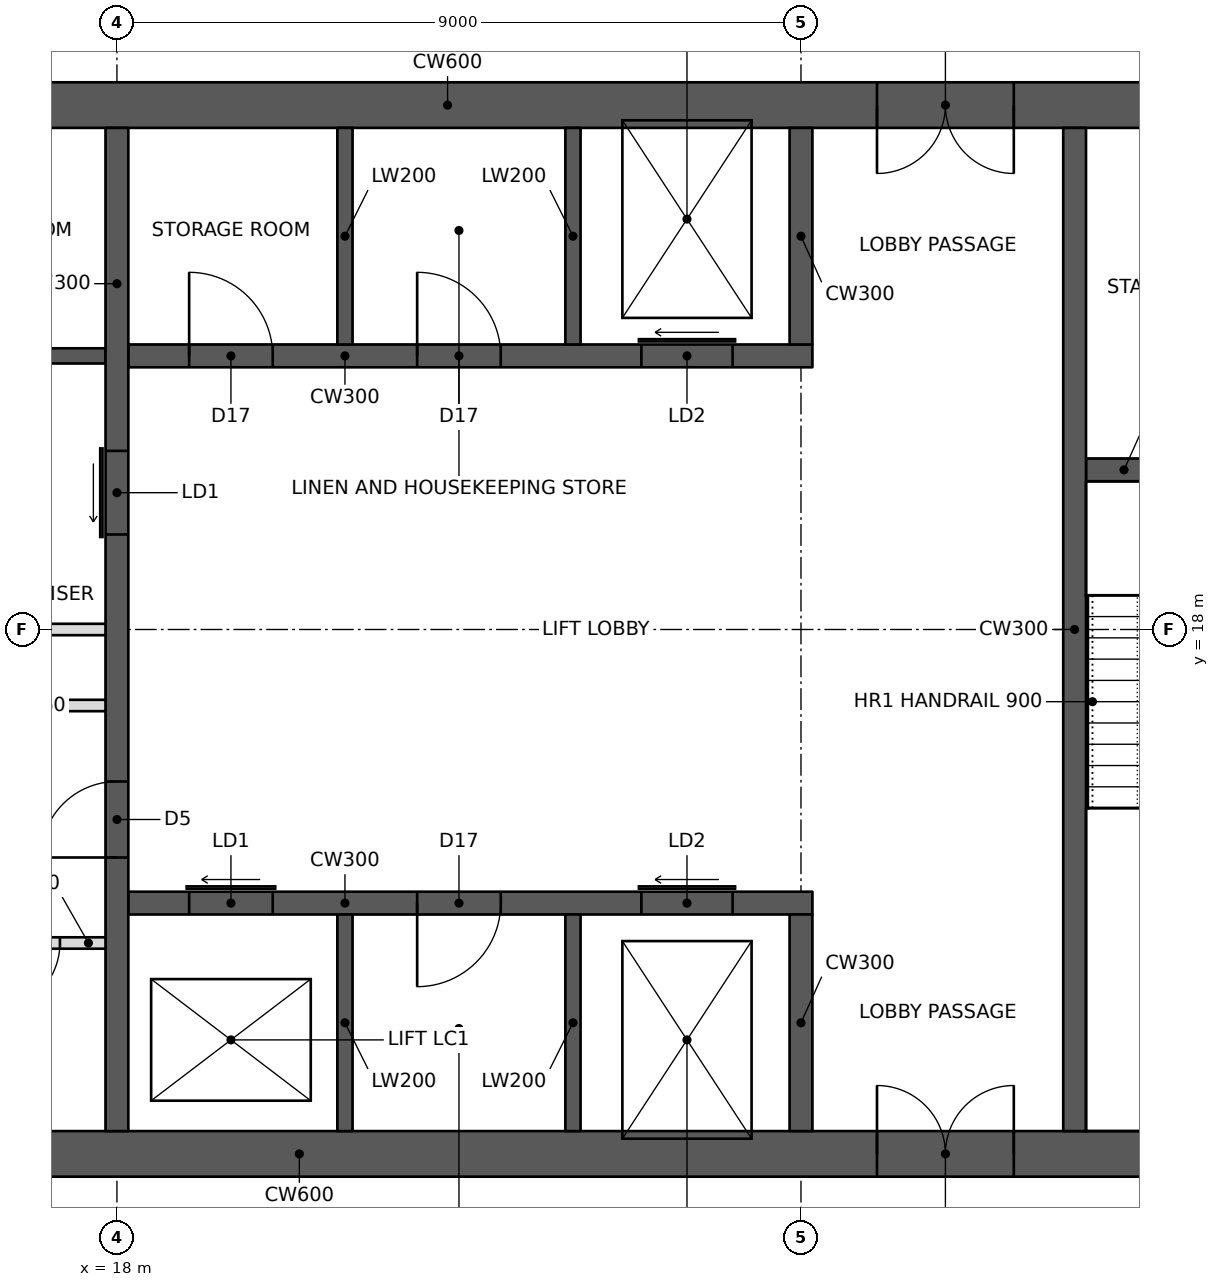
"""IFC4 building model, lengths in metres.
Left out: names, types, materials, properties, quantities, classifications, styles, units other than length and angle.
Written with IfcOpenShell. Run it as: python <this file> out.ifc"""

import sys

from ifc_helpers import new_model, si_unit, direction, frame, frame_2d, origin, place, context, subcontext, project, spatial, rectangle, extrude, element, fill, save


model = new_model("IFC4")
c1 = context("Model", 3, precision=1e-05, world=origin(), true_north=direction((0.0, 1.0)))
c2 = subcontext(c1, "Body", "Model", "MODEL_VIEW")
j1 = project(units=[si_unit("LENGTHUNIT", "METRE"), si_unit("PLANEANGLEUNIT", "RADIAN")], contexts=[c1])
p1 = place(None, origin())
s1 = spatial("IfcSite", under=j1, at=p1, CompositionType="ELEMENT")
p2 = place(p1, origin())
s2 = spatial("IfcBuilding", under=s1, at=p2, CompositionType="ELEMENT")
p3 = place(p2, frame((0.0, 0.0, 248.2)))
s3 = spatial("IfcBuildingStorey", under=s2, at=p3, CompositionType="ELEMENT", Elevation=248.2)
p4 = place(p3, frame((10.8, 11.1, 0.0), z_axis=(0.0, 0.0, 1.0), x_axis=(1.0, 0.0, 0.0)))
e1 = element("IfcWall", 1, at=p4, inside=s3, PredefinedType="SHEAR", context=c2, shape_type="SweptSolid", body=[
    extrude(rectangle(XDim=23.4, YDim=0.6, at=frame_2d((11.7, 0.0))), origin(), (0.0, 0.0, 1.0), 3.6),
])
p5 = place(p4, frame((1.0, 0.0, 0.0)))
e2 = element("IfcOpeningElement", 2, at=p5, cuts=e1, PredefinedType="OPENING", context=c2, shape_type="SweptSolid", body=[
    extrude(rectangle(XDim=1.0, YDim=2.1, at=frame_2d((0.5, 1.05))), frame((0.0, 0.31, 0.0), z_axis=(0.0, -1.0, 0.0), x_axis=(1.0, 0.0, 0.0)), (0.0, 0.0, 1.0), 0.62),
])
p6 = place(p4, frame((17.2, 0.0, 0.0)))
e3 = element("IfcOpeningElement", 3, at=p6, cuts=e1, PredefinedType="OPENING", context=c2, shape_type="SweptSolid", body=[
    extrude(rectangle(XDim=1.8, YDim=2.1, at=frame_2d((0.9, 1.05))), frame((0.0, 0.31, 0.0), z_axis=(0.0, -1.0, 0.0), x_axis=(1.0, 0.0, 0.0)), (0.0, 0.0, 1.0), 0.62),
])
p7 = place(p3, frame((10.8, 24.9, 0.0), z_axis=(0.0, 0.0, 1.0), x_axis=(1.0, 0.0, 0.0)))
e4 = element("IfcWall", 4, at=p7, inside=s3, PredefinedType="SHEAR", context=c2, shape_type="SweptSolid", body=[
    extrude(rectangle(XDim=23.4, YDim=0.6, at=frame_2d((11.7, 0.0))), origin(), (0.0, 0.0, 1.0), 3.6),
])
p8 = place(p7, frame((17.2, 0.0, 0.0)))
e5 = element("IfcOpeningElement", 5, at=p8, cuts=e4, PredefinedType="OPENING", context=c2, shape_type="SweptSolid", body=[
    extrude(rectangle(XDim=1.8, YDim=2.1, at=frame_2d((0.9, 1.05))), frame((0.0, 0.31, 0.0), z_axis=(0.0, -1.0, 0.0), x_axis=(1.0, 0.0, 0.0)), (0.0, 0.0, 1.0), 0.62),
])
p9 = place(p7, frame((21.1, 0.0, 0.0)))
e6 = element("IfcOpeningElement", 6, at=p9, cuts=e4, PredefinedType="OPENING", context=c2, shape_type="SweptSolid", body=[
    extrude(rectangle(XDim=1.0, YDim=2.1, at=frame_2d((0.5, 1.05))), frame((0.0, 0.31, 0.0), z_axis=(0.0, -1.0, 0.0), x_axis=(1.0, 0.0, 0.0)), (0.0, 0.0, 1.0), 0.62),
])
p10 = place(p7, frame((4.9, 0.0, 0.0)))
e7 = element("IfcOpeningElement", 7, at=p10, cuts=e4, PredefinedType="OPENING", context=c2, shape_type="SweptSolid", body=[
    extrude(rectangle(XDim=1.0, YDim=2.1, at=frame_2d((0.5, 1.05))), frame((0.0, 0.31, 0.0), z_axis=(0.0, -1.0, 0.0), x_axis=(1.0, 0.0, 0.0)), (0.0, 0.0, 1.0), 0.62),
])
p11 = place(p3, frame((18.0, 11.4, 0.0), z_axis=(0.0, 0.0, 1.0), x_axis=(0.0, 1.0, 0.0)))
e8 = element("IfcWall", 8, at=p11, inside=s3, PredefinedType="SHEAR", context=c2, shape_type="SweptSolid", body=[
    extrude(rectangle(XDim=13.2, YDim=0.3, at=frame_2d((6.6, 0.0))), origin(), (0.0, 0.0, 1.0), 3.6),
])
p12 = place(p11, frame((3.6, 0.0, 0.0)))
e9 = element("IfcOpeningElement", 9, at=p12, cuts=e8, PredefinedType="OPENING", context=c2, shape_type="SweptSolid", body=[
    extrude(rectangle(XDim=1.0, YDim=2.1, at=frame_2d((0.5, 1.05))), frame((0.0, 0.16, 0.0), z_axis=(0.0, -1.0, 0.0), x_axis=(1.0, 0.0, 0.0)), (0.0, 0.0, 1.0), 0.32),
])
p13 = place(p11, frame((7.85, 0.0, 0.0)))
e10 = element("IfcOpeningElement", 10, at=p13, cuts=e8, PredefinedType="OPENING", context=c2, shape_type="SweptSolid", body=[
    extrude(rectangle(XDim=1.1, YDim=2.1, at=frame_2d((0.55, 1.05))), frame((0.0, 0.16, 0.0), z_axis=(0.0, -1.0, 0.0), x_axis=(1.0, 0.0, 0.0)), (0.0, 0.0, 1.0), 0.32),
])
p14 = place(p3, frame((14.55, 18.0, 0.0), z_axis=(0.0, 0.0, 1.0), x_axis=(1.0, 0.0, 0.0)))
e11 = element("IfcWall", 11, at=p14, inside=s3, PredefinedType="PARTITIONING", context=c2, shape_type="SweptSolid", body=[
    extrude(rectangle(XDim=3.3, YDim=0.15, at=frame_2d((1.65, 0.0))), origin(), (0.0, 0.0, 1.0), 3.4),
])
p15 = place(p3, frame((18.15, 14.4, 0.0), z_axis=(0.0, 0.0, 1.0), x_axis=(1.0, 0.0, 0.0)))
e12 = element("IfcWall", 12, at=p15, inside=s3, PredefinedType="SHEAR", context=c2, shape_type="SweptSolid", body=[
    extrude(rectangle(XDim=9.0, YDim=0.3, at=frame_2d((4.5, 0.0))), origin(), (0.0, 0.0, 1.0), 3.6),
])
p16 = place(p15, frame((0.8, 0.0, 0.0)))
e13 = element("IfcOpeningElement", 13, at=p16, cuts=e12, PredefinedType="OPENING", context=c2, shape_type="SweptSolid", body=[
    extrude(rectangle(XDim=1.1, YDim=2.1, at=frame_2d((0.55, 1.05))), frame((0.0, 0.16, 0.0), z_axis=(0.0, -1.0, 0.0), x_axis=(1.0, 0.0, 0.0)), (0.0, 0.0, 1.0), 0.32),
])
p17 = place(p15, frame((6.75, 0.0, 0.0)))
e14 = element("IfcOpeningElement", 14, at=p17, cuts=e12, PredefinedType="OPENING", context=c2, shape_type="SweptSolid", body=[
    extrude(rectangle(XDim=1.2, YDim=2.1, at=frame_2d((0.6, 1.05))), frame((0.0, 0.16, 0.0), z_axis=(0.0, -1.0, 0.0), x_axis=(1.0, 0.0, 0.0)), (0.0, 0.0, 1.0), 0.32),
])
p18 = place(p15, frame((3.8, 0.0, 0.0)))
e15 = element("IfcOpeningElement", 15, at=p18, cuts=e12, PredefinedType="OPENING", context=c2, shape_type="SweptSolid", body=[
    extrude(rectangle(XDim=1.1, YDim=2.1, at=frame_2d((0.55, 1.05))), frame((0.0, 0.16, 0.0), z_axis=(0.0, -1.0, 0.0), x_axis=(1.0, 0.0, 0.0)), (0.0, 0.0, 1.0), 0.32),
])
p19 = place(p3, frame((27.0, 11.4, 0.0), z_axis=(0.0, 0.0, 1.0), x_axis=(0.0, 1.0, 0.0)))
e16 = element("IfcWall", 16, at=p19, inside=s3, PredefinedType="SHEAR", context=c2, shape_type="SweptSolid", body=[
    extrude(rectangle(XDim=2.85, YDim=0.3, at=frame_2d((1.425, 0.0))), origin(), (0.0, 0.0, 1.0), 3.6),
])
for number, where, z_axis, x_axis in (
    (17, (21.0, 11.4, 0.0), (0.0, 0.0, 1.0), (0.0, 1.0, 0.0)),
    (18, (24.0, 11.4, 0.0), (0.0, 0.0, 1.0), (0.0, 1.0, 0.0)),
):
    element("IfcWall", number, at=place(p3, frame(where, z_axis=z_axis, x_axis=x_axis)), inside=s3, PredefinedType="SHEAR", context=c2, shape_type="SweptSolid", body=[
        extrude(rectangle(XDim=2.85, YDim=0.2, at=frame_2d((1.425, 0.0))), origin(), (0.0, 0.0, 1.0), 3.6),
    ])
p20 = place(p3, frame((18.15, 21.6, 0.0), z_axis=(0.0, 0.0, 1.0), x_axis=(1.0, 0.0, 0.0)))
e19 = element("IfcWall", 19, at=p20, inside=s3, PredefinedType="SHEAR", context=c2, shape_type="SweptSolid", body=[
    extrude(rectangle(XDim=9.0, YDim=0.3, at=frame_2d((4.5, 0.0))), origin(), (0.0, 0.0, 1.0), 3.6),
])
p21 = place(p20, frame((6.75, 0.0, 0.0)))
e20 = element("IfcOpeningElement", 20, at=p21, cuts=e19, PredefinedType="OPENING", context=c2, shape_type="SweptSolid", body=[
    extrude(rectangle(XDim=1.2, YDim=2.1, at=frame_2d((0.6, 1.05))), frame((0.0, 0.16, 0.0), z_axis=(0.0, -1.0, 0.0), x_axis=(1.0, 0.0, 0.0)), (0.0, 0.0, 1.0), 0.32),
])
p22 = place(p20, frame((0.8, 0.0, 0.0)))
e21 = element("IfcOpeningElement", 21, at=p22, cuts=e19, PredefinedType="OPENING", context=c2, shape_type="SweptSolid", body=[
    extrude(rectangle(XDim=1.1, YDim=2.1, at=frame_2d((0.55, 1.05))), frame((0.0, 0.16, 0.0), z_axis=(0.0, -1.0, 0.0), x_axis=(1.0, 0.0, 0.0)), (0.0, 0.0, 1.0), 0.32),
])
p23 = place(p20, frame((3.8, 0.0, 0.0)))
e22 = element("IfcOpeningElement", 22, at=p23, cuts=e19, PredefinedType="OPENING", context=c2, shape_type="SweptSolid", body=[
    extrude(rectangle(XDim=1.1, YDim=2.1, at=frame_2d((0.55, 1.05))), frame((0.0, 0.16, 0.0), z_axis=(0.0, -1.0, 0.0), x_axis=(1.0, 0.0, 0.0)), (0.0, 0.0, 1.0), 0.32),
])
p24 = place(p3, frame((27.0, 21.75, 0.0), z_axis=(0.0, 0.0, 1.0), x_axis=(0.0, 1.0, 0.0)))
e23 = element("IfcWall", 23, at=p24, inside=s3, PredefinedType="SHEAR", context=c2, shape_type="SweptSolid", body=[
    extrude(rectangle(XDim=2.85, YDim=0.3, at=frame_2d((1.425, 0.0))), origin(), (0.0, 0.0, 1.0), 3.6),
])
for number, where, z_axis, x_axis in (
    (24, (21.0, 21.75, 0.0), (0.0, 0.0, 1.0), (0.0, 1.0, 0.0)),
    (25, (24.0, 21.75, 0.0), (0.0, 0.0, 1.0), (0.0, 1.0, 0.0)),
):
    element("IfcWall", number, at=place(p3, frame(where, z_axis=z_axis, x_axis=x_axis)), inside=s3, PredefinedType="SHEAR", context=c2, shape_type="SweptSolid", body=[
        extrude(rectangle(XDim=2.85, YDim=0.2, at=frame_2d((1.425, 0.0))), origin(), (0.0, 0.0, 1.0), 3.6),
    ])
p25 = place(p3, frame((30.6, 11.4, 0.0), z_axis=(0.0, 0.0, 1.0), x_axis=(0.0, 1.0, 0.0)))
e26 = element("IfcWall", 26, at=p25, inside=s3, PredefinedType="SHEAR", context=c2, shape_type="SweptSolid", body=[
    extrude(rectangle(XDim=13.2, YDim=0.3, at=frame_2d((6.6, 0.0))), origin(), (0.0, 0.0, 1.0), 3.6),
])
p26 = place(p3, frame((30.75, 20.1, 0.0), z_axis=(0.0, 0.0, 1.0), x_axis=(1.0, 0.0, 0.0)))
e27 = element("IfcWall", 27, at=p26, inside=s3, PredefinedType="SHEAR", context=c2, shape_type="SweptSolid", body=[
    extrude(rectangle(XDim=2.85, YDim=0.3, at=frame_2d((1.425, 0.0))), origin(), (0.0, 0.0, 1.0), 3.6),
])
p27 = place(p26, frame((1.15, 0.0, 0.0)))
e28 = element("IfcOpeningElement", 28, at=p27, cuts=e27, PredefinedType="OPENING", context=c2, shape_type="SweptSolid", body=[
    extrude(rectangle(XDim=1.0, YDim=2.1, at=frame_2d((0.5, 1.05))), frame((0.0, 0.16, 0.0), z_axis=(0.0, -1.0, 0.0), x_axis=(1.0, 0.0, 0.0)), (0.0, 0.0, 1.0), 0.32),
])
p28 = place(p3, frame((14.55, 21.6, 0.0), z_axis=(0.0, 0.0, 1.0), x_axis=(1.0, 0.0, 0.0)))
e29 = element("IfcWall", 29, at=p28, inside=s3, PredefinedType="SHEAR", context=c2, shape_type="SweptSolid", body=[
    extrude(rectangle(XDim=3.3, YDim=0.2, at=frame_2d((1.65, 0.0))), origin(), (0.0, 0.0, 1.0), 3.6),
])
p29 = place(p3, frame((14.55, 17.0, 0.0), z_axis=(0.0, 0.0, 1.0), x_axis=(1.0, 0.0, 0.0)))
e30 = element("IfcWall", 30, at=p29, inside=s3, PredefinedType="PARTITIONING", context=c2, shape_type="SweptSolid", body=[
    extrude(rectangle(XDim=3.3, YDim=0.15, at=frame_2d((1.65, 0.0))), origin(), (0.0, 0.0, 1.0), 3.4),
])
p30 = place(p29, frame((0.3, 0.0, 0.0)))
e31 = element("IfcOpeningElement", 31, at=p30, cuts=e30, PredefinedType="OPENING", context=c2, shape_type="SweptSolid", body=[
    extrude(rectangle(XDim=1.0, YDim=2.1, at=frame_2d((0.5, 1.05))), frame((0.0, 0.085, 0.0), z_axis=(0.0, -1.0, 0.0), x_axis=(1.0, 0.0, 0.0)), (0.0, 0.0, 1.0), 0.17),
])
p31 = place(p3, frame((14.55, 13.875, 0.0), z_axis=(0.0, 0.0, 1.0), x_axis=(1.0, 0.0, 0.0)))
e32 = element("IfcWall", 32, at=p31, inside=s3, PredefinedType="PARTITIONING", context=c2, shape_type="SweptSolid", body=[
    extrude(rectangle(XDim=3.3, YDim=0.15, at=frame_2d((1.65, 0.0))), origin(), (0.0, 0.0, 1.0), 3.4),
])
p32 = place(p31, frame((0.2, 0.0, 0.0)))
e33 = element("IfcOpeningElement", 33, at=p32, cuts=e32, PredefinedType="OPENING", context=c2, shape_type="SweptSolid", body=[
    extrude(rectangle(XDim=0.9, YDim=2.1, at=frame_2d((0.45, 1.05))), frame((0.0, 0.085, 0.0), z_axis=(0.0, -1.0, 0.0), x_axis=(1.0, 0.0, 0.0)), (0.0, 0.0, 1.0), 0.17),
])
p33 = place(p31, frame((1.8, 0.0, 0.0)))
e34 = element("IfcOpeningElement", 34, at=p33, cuts=e32, PredefinedType="OPENING", context=c2, shape_type="SweptSolid", body=[
    extrude(rectangle(XDim=0.9, YDim=2.1, at=frame_2d((0.45, 1.05))), frame((0.0, 0.085, 0.0), z_axis=(0.0, -1.0, 0.0), x_axis=(1.0, 0.0, 0.0)), (0.0, 0.0, 1.0), 0.17),
])
p34 = place(p33, frame((0.9, 0.0, 0.0), z_axis=(0.0, 0.0, 1.0), x_axis=(-1.0, 0.0, 0.0)))
e35 = element("IfcDoor", 35, at=p34, inside=s3, OperationType="SINGLE_SWING_RIGHT", PredefinedType="DOOR", context=c2, shape_type="SweptSolid", body=[
    extrude(rectangle(XDim=0.9, YDim=2.1, at=frame_2d((0.45, 1.05))), frame((0.0, 0.025, 0.0), z_axis=(0.0, -1.0, 0.0), x_axis=(1.0, 0.0, 0.0)), (0.0, 0.0, 1.0), 0.05),
])
fill(e34, e35)
p35 = place(p6, origin())
e36 = element("IfcDoor", 36, at=p35, inside=s3, OperationType="DOUBLE_DOOR_SINGLE_SWING", PredefinedType="DOOR", context=c2, shape_type="SweptSolid", body=[
    extrude(rectangle(XDim=1.8, YDim=2.1, at=frame_2d((0.9, 1.05))), frame((0.0, 0.025, 0.0), z_axis=(0.0, -1.0, 0.0), x_axis=(1.0, 0.0, 0.0)), (0.0, 0.0, 1.0), 0.05),
])
fill(e3, e36)
p36 = place(p8, frame((1.8, 0.0, 0.0), z_axis=(0.0, 0.0, 1.0), x_axis=(-1.0, 0.0, 0.0)))
e37 = element("IfcDoor", 37, at=p36, inside=s3, OperationType="DOUBLE_DOOR_SINGLE_SWING", PredefinedType="DOOR", context=c2, shape_type="SweptSolid", body=[
    extrude(rectangle(XDim=1.8, YDim=2.1, at=frame_2d((0.9, 1.05))), frame((0.0, 0.025, 0.0), z_axis=(0.0, -1.0, 0.0), x_axis=(1.0, 0.0, 0.0)), (0.0, 0.0, 1.0), 0.05),
])
fill(e5, e37)
p37 = place(p12, origin())
e38 = element("IfcDoor", 38, at=p37, inside=s3, OperationType="SINGLE_SWING_LEFT", PredefinedType="DOOR", context=c2, shape_type="SweptSolid", body=[
    extrude(rectangle(XDim=1.0, YDim=2.1, at=frame_2d((0.5, 1.05))), frame((0.0, 0.025, 0.0), z_axis=(0.0, -1.0, 0.0), x_axis=(1.0, 0.0, 0.0)), (0.0, 0.0, 1.0), 0.05),
])
fill(e9, e38)
p38 = place(p16, origin())
e39 = element("IfcDoor", 39, at=p38, inside=s3, OperationType="SLIDING_TO_LEFT", PredefinedType="DOOR", context=c2, shape_type="SweptSolid", body=[
    extrude(rectangle(XDim=1.1, YDim=2.1, at=frame_2d((0.55, 1.05))), frame((0.0, 0.025, 0.0), z_axis=(0.0, -1.0, 0.0), x_axis=(1.0, 0.0, 0.0)), (0.0, 0.0, 1.0), 0.05),
])
fill(e13, e39)
p39 = place(p13, origin())
e40 = element("IfcDoor", 40, at=p39, inside=s3, OperationType="SLIDING_TO_LEFT", PredefinedType="DOOR", context=c2, shape_type="SweptSolid", body=[
    extrude(rectangle(XDim=1.1, YDim=2.1, at=frame_2d((0.55, 1.05))), frame((0.0, 0.025, 0.0), z_axis=(0.0, -1.0, 0.0), x_axis=(1.0, 0.0, 0.0)), (0.0, 0.0, 1.0), 0.05),
])
fill(e10, e40)
p40 = place(p17, origin())
e41 = element("IfcDoor", 41, at=p40, inside=s3, OperationType="SLIDING_TO_LEFT", PredefinedType="DOOR", context=c2, shape_type="SweptSolid", body=[
    extrude(rectangle(XDim=1.2, YDim=2.1, at=frame_2d((0.6, 1.05))), frame((0.0, 0.025, 0.0), z_axis=(0.0, -1.0, 0.0), x_axis=(1.0, 0.0, 0.0)), (0.0, 0.0, 1.0), 0.05),
])
fill(e14, e41)
p41 = place(p21, origin())
e42 = element("IfcDoor", 42, at=p41, inside=s3, OperationType="SLIDING_TO_LEFT", PredefinedType="DOOR", context=c2, shape_type="SweptSolid", body=[
    extrude(rectangle(XDim=1.2, YDim=2.1, at=frame_2d((0.6, 1.05))), frame((0.0, 0.025, 0.0), z_axis=(0.0, -1.0, 0.0), x_axis=(1.0, 0.0, 0.0)), (0.0, 0.0, 1.0), 0.05),
])
fill(e20, e42)
p42 = place(p22, origin())
e43 = element("IfcDoor", 43, at=p42, inside=s3, OperationType="SINGLE_SWING_LEFT", PredefinedType="DOOR", context=c2, shape_type="SweptSolid", body=[
    extrude(rectangle(XDim=1.1, YDim=2.1, at=frame_2d((0.55, 1.05))), frame((0.0, 0.025, 0.0), z_axis=(0.0, -1.0, 0.0), x_axis=(1.0, 0.0, 0.0)), (0.0, 0.0, 1.0), 0.05),
])
fill(e21, e43)
p43 = place(p23, origin())
e44 = element("IfcDoor", 44, at=p43, inside=s3, OperationType="SINGLE_SWING_LEFT", PredefinedType="DOOR", context=c2, shape_type="SweptSolid", body=[
    extrude(rectangle(XDim=1.1, YDim=2.1, at=frame_2d((0.55, 1.05))), frame((0.0, 0.025, 0.0), z_axis=(0.0, -1.0, 0.0), x_axis=(1.0, 0.0, 0.0)), (0.0, 0.0, 1.0), 0.05),
])
fill(e22, e44)
p44 = place(p18, frame((1.1, 0.0, 0.0), z_axis=(0.0, 0.0, 1.0), x_axis=(-1.0, 0.0, 0.0)))
e45 = element("IfcDoor", 45, at=p44, inside=s3, OperationType="SINGLE_SWING_RIGHT", PredefinedType="DOOR", context=c2, shape_type="SweptSolid", body=[
    extrude(rectangle(XDim=1.1, YDim=2.1, at=frame_2d((0.55, 1.05))), frame((0.0, 0.025, 0.0), z_axis=(0.0, -1.0, 0.0), x_axis=(1.0, 0.0, 0.0)), (0.0, 0.0, 1.0), 0.05),
])
fill(e15, e45)
save(model, sys.argv[1])
